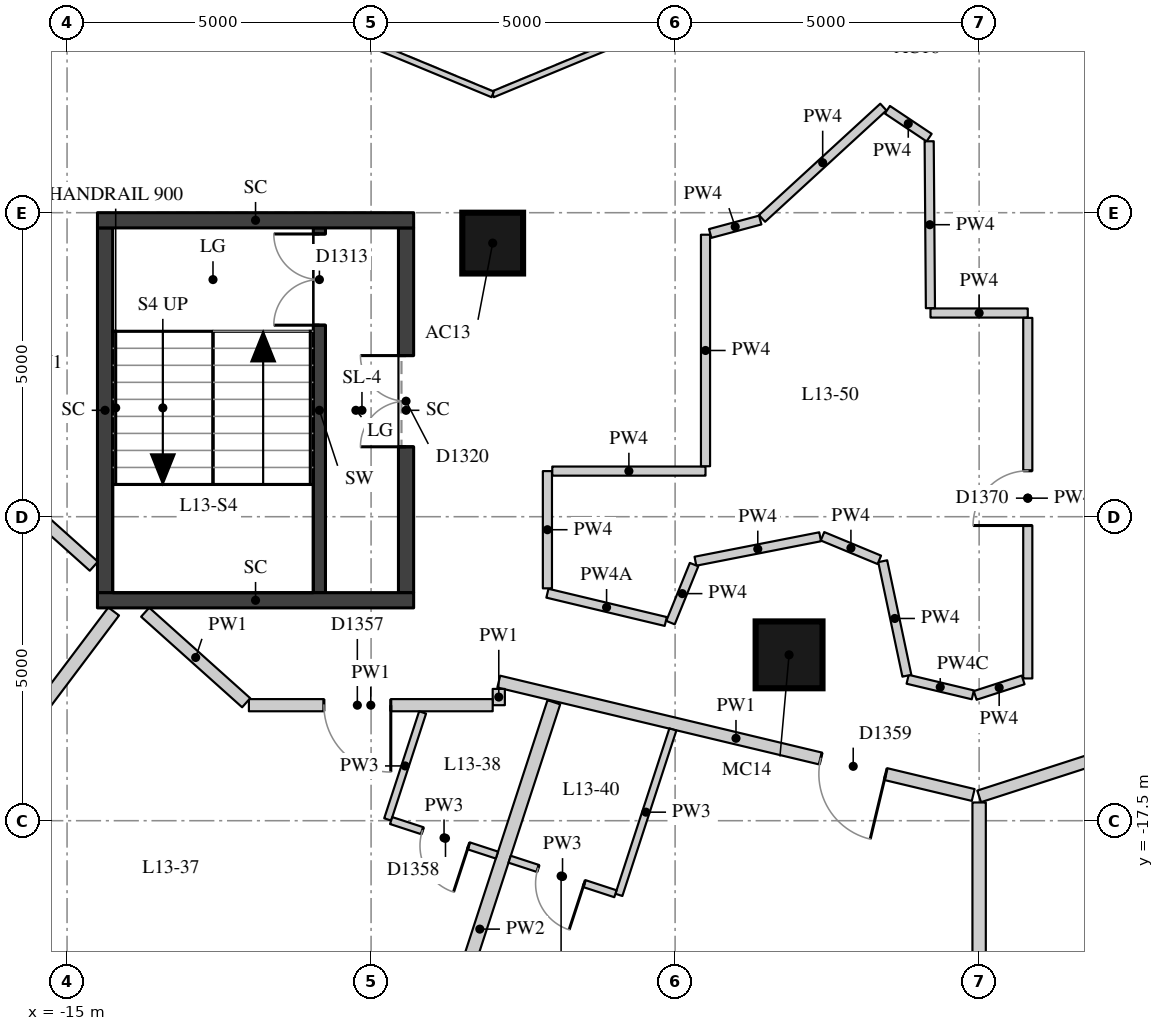
"""IFC4 building model, lengths in metres.
Left out: names, types, materials, properties, quantities, classifications, styles, units other than length and angle.
Written with IfcOpenShell. Run it as: python <this file> out.ifc"""

import sys

from ifc_helpers import new_model, si_unit, direction, frame, frame_2d, origin, origin_2d, place, context, subcontext, project, spatial, rectangle, extrude, element, fill, save


model = new_model("IFC4")
c1 = context("Model", 3, precision=1e-05, world=origin(), true_north=direction((0.0, 1.0)))
c2 = subcontext(c1, "Body", "Model", "MODEL_VIEW")
j1 = project(units=[si_unit("LENGTHUNIT", "METRE"), si_unit("PLANEANGLEUNIT", "RADIAN")], contexts=[c1])
p1 = place(None, origin())
s1 = spatial("IfcSite", under=j1, at=p1, CompositionType="ELEMENT")
p2 = place(p1, origin())
s2 = spatial("IfcBuilding", under=s1, at=p2, CompositionType="ELEMENT")
p3 = place(p2, frame((0.0, 0.0, 51.4)))
s3 = spatial("IfcBuildingStorey", under=s2, at=p3, CompositionType="ELEMENT", Elevation=51.4)
p4 = place(p3, frame((-8.0, -8.0, 0.0), z_axis=(0.0, 0.0, 1.0), x_axis=(1.0, 0.0, 0.0)))
e1 = element("IfcColumn", 1, at=p4, inside=s3, PredefinedType="COLUMN", context=c2, shape_type="SweptSolid", body=[
    extrude(rectangle(XDim=1.0, YDim=1.0, at=origin_2d()), origin(), (0.0, 0.0, 1.0), 3.3),
])
p5 = place(p3, frame((-3.126, -14.772, 0.0), z_axis=(0.0, 0.0, 1.0), x_axis=(1.0, 0.0, 0.0)))
e2 = element("IfcColumn", 2, at=p5, inside=s3, PredefinedType="COLUMN", context=c2, shape_type="SweptSolid", body=[
    extrude(rectangle(XDim=1.1, YDim=1.1, at=origin_2d()), origin(), (0.0, 0.0, 1.0), 3.3),
])
p6 = place(p3, frame((-10.85, -13.75, 0.0), z_axis=(0.0, 0.0, 1.0), x_axis=(0.0, 1.0, 0.0)))
e3 = element("IfcWall", 3, at=p6, inside=s3, PredefinedType="SHEAR", context=c2, shape_type="SweptSolid", body=[
    extrude(rectangle(XDim=6.0, YDim=0.2, at=frame_2d((3.0, 0.0))), origin(), (0.0, 0.0, 1.0), 3.02),
])
p7 = place(p6, frame((4.4, 0.0, 0.0)))
e4 = element("IfcOpeningElement", 4, at=p7, cuts=e3, PredefinedType="OPENING", context=c2, shape_type="SweptSolid", body=[
    extrude(rectangle(XDim=1.5, YDim=2.1, at=frame_2d((0.75, 1.05))), frame((0.0, 0.11, 0.0), z_axis=(0.0, -1.0, 0.0), x_axis=(1.0, 0.0, 0.0)), (0.0, 0.0, 1.0), 0.22),
])
p8 = place(p3, frame((-14.375, -13.75, -0.28), z_axis=(0.0, 0.0, 1.0), x_axis=(0.0, 1.0, 0.0)))
e5 = element("IfcWall", 5, at=p8, inside=s3, PredefinedType="SHEAR", context=c2, shape_type="SweptSolid", body=[
    extrude(rectangle(XDim=6.0, YDim=0.25, at=frame_2d((3.0, 0.0))), origin(), (0.0, 0.0, 1.0), 3.3),
])
p9 = place(p3, frame((-9.425, -13.75, -0.28), z_axis=(0.0, 0.0, 1.0), x_axis=(0.0, 1.0, 0.0)))
e6 = element("IfcWall", 6, at=p9, inside=s3, PredefinedType="SHEAR", context=c2, shape_type="SweptSolid", body=[
    extrude(rectangle(XDim=6.0, YDim=0.25, at=frame_2d((3.0, 0.0))), origin(), (0.0, 0.0, 1.0), 3.3),
])
p10 = place(p9, frame((2.4, 0.0, 0.28)))
e7 = element("IfcOpeningElement", 7, at=p10, cuts=e6, PredefinedType="OPENING", context=c2, shape_type="SweptSolid", body=[
    extrude(rectangle(XDim=1.5, YDim=2.1, at=frame_2d((0.75, 1.05))), frame((0.0, 0.135, 0.0), z_axis=(0.0, -1.0, 0.0), x_axis=(1.0, 0.0, 0.0)), (0.0, 0.0, 1.0), 0.27),
])
for number, where, z_axis, x_axis in (
    (8, (-14.5, -7.625, -0.28), (0.0, 0.0, 1.0), (1.0, 0.0, 0.0)),
    (9, (-14.5, -13.875, -0.28), (0.0, 0.0, 1.0), (1.0, 0.0, 0.0)),
):
    element("IfcWall", number, at=place(p3, frame(where, z_axis=z_axis, x_axis=x_axis)), inside=s3, PredefinedType="SHEAR", context=c2, shape_type="SweptSolid", body=[
        extrude(rectangle(XDim=5.2, YDim=0.25, at=frame_2d((2.6, 0.0))), origin(), (0.0, 0.0, 1.0), 3.3),
    ])
p11 = place(p3, frame((-14.559, -13.314, 0.0), z_axis=(0.0, 0.0, 1.0), x_axis=(-0.744636171002, 0.667470578254, 0.0)))
e10 = element("IfcWall", 10, at=p11, inside=s3, PredefinedType="PARTITIONING", context=c2, shape_type="SweptSolid", body=[
    extrude(rectangle(XDim=2.069, YDim=0.2, at=frame_2d((1.035, 0.0))), origin(), (0.0, 0.0, 1.0), 3.02),
])
p12 = place(p3, frame((10.792, -13.612, 0.0), z_axis=(0.0, 0.0, 1.0), x_axis=(-0.951542928403, -0.307515943336, 0.0)))
e11 = element("IfcWall", 11, at=p12, inside=s3, PredefinedType="PARTITIONING", context=c2, shape_type="SweptSolid", body=[
    extrude(rectangle(XDim=11.342, YDim=0.2, at=frame_2d((5.671, 0.0))), origin(), (0.0, 0.0, 1.0), 3.02),
])
p13 = place(p12, frame((3.239, 0.0, 0.0)))
e12 = element("IfcOpeningElement", 12, at=p13, cuts=e11, PredefinedType="OPENING", context=c2, shape_type="SweptSolid", body=[
    extrude(rectangle(XDim=1.1, YDim=2.1, at=frame_2d((0.55, 1.05))), frame((0.0, 0.11, 0.0), z_axis=(0.0, -1.0, 0.0), x_axis=(1.0, 0.0, 0.0)), (0.0, 0.0, 1.0), 0.22),
])
p14 = place(p3, frame((-0.098, -17.077, 0.0), z_axis=(0.0, 0.0, 1.0), x_axis=(-0.972607318404, 0.232454305588, 0.0)))
e13 = element("IfcWall", 13, at=p14, inside=s3, PredefinedType="PARTITIONING", context=c2, shape_type="SweptSolid", body=[
    extrude(rectangle(XDim=8.022, YDim=0.2, at=frame_2d((4.011, 0.0))), origin(), (0.0, 0.0, 1.0), 3.02),
])
p15 = place(p14, frame((1.479, 0.0, 0.0)))
e14 = element("IfcOpeningElement", 14, at=p15, cuts=e13, PredefinedType="OPENING", context=c2, shape_type="SweptSolid", body=[
    extrude(rectangle(XDim=1.1, YDim=2.1, at=frame_2d((0.55, 1.05))), frame((0.0, 0.11, 0.0), z_axis=(0.0, -1.0, 0.0), x_axis=(1.0, 0.0, 0.0)), (0.0, 0.0, 1.0), 0.22),
])
p16 = place(p3, frame((-7.9, -15.332, 0.0), z_axis=(0.0, 0.0, 1.0), x_axis=(0.0, -1.0, 0.0)))
e15 = element("IfcWall", 15, at=p16, inside=s3, PredefinedType="PARTITIONING", context=c2, shape_type="SweptSolid", body=[
    extrude(rectangle(XDim=0.268, YDim=0.2, at=frame_2d((0.134, 0.0))), origin(), (0.0, 0.0, 1.0), 3.02),
])
p17 = place(p3, frame((-8.0, -15.6, 0.0), z_axis=(0.0, 0.0, 1.0), x_axis=(-1.0, 0.0, 0.0)))
e16 = element("IfcWall", 16, at=p17, inside=s3, PredefinedType="PARTITIONING", context=c2, shape_type="SweptSolid", body=[
    extrude(rectangle(XDim=4.009, YDim=0.2, at=frame_2d((2.005, 0.0))), origin(), (0.0, 0.0, 1.0), 3.02),
])
p18 = place(p17, frame((1.676, 0.0, 0.0)))
e17 = element("IfcOpeningElement", 17, at=p18, cuts=e16, PredefinedType="OPENING", context=c2, shape_type="SweptSolid", body=[
    extrude(rectangle(XDim=1.1, YDim=2.1, at=frame_2d((0.55, 1.05))), frame((0.0, 0.11, 0.0), z_axis=(0.0, -1.0, 0.0), x_axis=(1.0, 0.0, 0.0)), (0.0, 0.0, 1.0), 0.22),
])
p19 = place(p3, frame((-12.054, -15.56, 0.0), z_axis=(0.0, 0.0, 1.0), x_axis=(-0.744625700487, 0.66748225907, 0.0)))
e18 = element("IfcWall", 18, at=p19, inside=s3, PredefinedType="PARTITIONING", context=c2, shape_type="SweptSolid", body=[
    extrude(rectangle(XDim=2.231, YDim=0.2, at=frame_2d((1.116, 0.0))), origin(), (0.0, 0.0, 1.0), 3.02),
])
p20 = place(p3, frame((-0.8, -9.15, 0.0), z_axis=(0.0, 0.0, 1.0), x_axis=(1.0, 0.0, 0.0)))
e19 = element("IfcWall", 19, at=p20, inside=s3, PredefinedType="PARTITIONING", context=c2, shape_type="SweptSolid", body=[
    extrude(rectangle(XDim=1.6, YDim=0.15, at=frame_2d((0.8, 0.0))), origin(), (0.0, 0.0, 1.0), 3.02),
])
p21 = place(p3, frame((0.8, -9.23, 0.0), z_axis=(0.0, 0.0, 1.0), x_axis=(0.0, -1.0, 0.0)))
e20 = element("IfcWall", 20, at=p21, inside=s3, PredefinedType="PARTITIONING", context=c2, shape_type="SweptSolid", body=[
    extrude(rectangle(XDim=5.93, YDim=0.15, at=frame_2d((2.965, 0.0))), origin(), (0.0, 0.0, 1.0), 3.02),
])
p22 = place(p21, frame((2.515, 0.0, 0.0)))
e21 = element("IfcOpeningElement", 21, at=p22, cuts=e20, PredefinedType="OPENING", context=c2, shape_type="SweptSolid", body=[
    extrude(rectangle(XDim=0.9, YDim=2.1, at=frame_2d((0.45, 1.05))), frame((0.0, 0.085, 0.0), z_axis=(0.0, -1.0, 0.0), x_axis=(1.0, 0.0, 0.0)), (0.0, 0.0, 1.0), 0.17),
])
p23 = place(p3, frame((0.724, -15.184, 0.0), z_axis=(0.0, 0.0, 1.0), x_axis=(-0.951444518554, -0.307820285415, 0.0)))
e22 = element("IfcWall", 22, at=p23, inside=s3, PredefinedType="PARTITIONING", context=c2, shape_type="SweptSolid", body=[
    extrude(rectangle(XDim=0.829, YDim=0.15, at=frame_2d((0.415, 0.0))), origin(), (0.0, 0.0, 1.0), 3.02),
])
p24 = place(p3, frame((-0.104, -15.43, 0.0), z_axis=(0.0, 0.0, 1.0), x_axis=(-0.972630060885, 0.232359128642, 0.0)))
e23 = element("IfcWall", 23, at=p24, inside=s3, PredefinedType="PARTITIONING", context=c2, shape_type="SweptSolid", body=[
    extrude(rectangle(XDim=1.102, YDim=0.15, at=frame_2d((0.551, 0.0))), origin(), (0.0, 0.0, 1.0), 2.42),
])
p25 = place(p3, frame((-1.188, -15.115, 0.0), z_axis=(0.0, 0.0, 1.0), x_axis=(-0.20649628494, 0.978447384536, 0.0)))
e24 = element("IfcWall", 24, at=p25, inside=s3, PredefinedType="PARTITIONING", context=c2, shape_type="SweptSolid", body=[
    extrude(rectangle(XDim=1.925, YDim=0.15, at=frame_2d((0.962, 0.0))), origin(), (0.0, 0.0, 1.0), 3.02),
])
p26 = place(p3, frame((-1.641, -13.209, 0.0), z_axis=(0.0, 0.0, 1.0), x_axis=(-0.923725449546, 0.383055209937, 0.0)))
e25 = element("IfcWall", 25, at=p26, inside=s3, PredefinedType="PARTITIONING", context=c2, shape_type="SweptSolid", body=[
    extrude(rectangle(XDim=1.011, YDim=0.15, at=frame_2d((0.506, 0.0))), origin(), (0.0, 0.0, 1.0), 3.02),
])
p27 = place(p3, frame((-2.615, -12.83, 0.0), z_axis=(0.0, 0.0, 1.0), x_axis=(-0.981297312652, -0.192498270593, 0.0)))
e26 = element("IfcWall", 26, at=p27, inside=s3, PredefinedType="PARTITIONING", context=c2, shape_type="SweptSolid", body=[
    extrude(rectangle(XDim=2.09, YDim=0.15, at=frame_2d((1.045, 0.0))), origin(), (0.0, 0.0, 1.0), 3.02),
])
p28 = place(p3, frame((-4.688, -13.288, 0.0), z_axis=(0.0, 0.0, 1.0), x_axis=(-0.375963709287, -0.926634388148, 0.0)))
e27 = element("IfcWall", 27, at=p28, inside=s3, PredefinedType="PARTITIONING", context=c2, shape_type="SweptSolid", body=[
    extrude(rectangle(XDim=1.03, YDim=0.15, at=frame_2d((0.515, 0.0))), origin(), (0.0, 0.0, 1.0), 3.02),
])
p29 = place(p3, frame((-5.154, -14.224, 0.0), z_axis=(0.0, 0.0, 1.0), x_axis=(-0.97258848944, 0.232533073366, 0.0)))
e28 = element("IfcWall", 28, at=p29, inside=s3, PredefinedType="PARTITIONING", context=c2, shape_type="SweptSolid", body=[
    extrude(rectangle(XDim=2.001, YDim=0.15, at=frame_2d((1.0, 0.0))), origin(), (0.0, 0.0, 1.0), 2.57),
])
p30 = place(p3, frame((-7.1, -13.678, 0.0), z_axis=(0.0, 0.0, 1.0), x_axis=(0.0, 1.0, 0.0)))
e29 = element("IfcWall", 29, at=p30, inside=s3, PredefinedType="PARTITIONING", context=c2, shape_type="SweptSolid", body=[
    extrude(rectangle(XDim=1.928, YDim=0.15, at=frame_2d((0.964, 0.0))), origin(), (0.0, 0.0, 1.0), 3.02),
])
p31 = place(p3, frame((-7.02, -11.75, 0.0), z_axis=(0.0, 0.0, 1.0), x_axis=(1.0, 0.0, 0.0)))
e30 = element("IfcWall", 30, at=p31, inside=s3, PredefinedType="PARTITIONING", context=c2, shape_type="SweptSolid", body=[
    extrude(rectangle(XDim=2.52, YDim=0.15, at=frame_2d((1.26, 0.0))), origin(), (0.0, 0.0, 1.0), 3.02),
])
p32 = place(p3, frame((-4.5, -11.67, 0.0), z_axis=(0.0, 0.0, 1.0), x_axis=(0.0, 1.0, 0.0)))
e31 = element("IfcWall", 31, at=p32, inside=s3, PredefinedType="PARTITIONING", context=c2, shape_type="SweptSolid", body=[
    extrude(rectangle(XDim=3.808, YDim=0.15, at=frame_2d((1.904, 0.0))), origin(), (0.0, 0.0, 1.0), 3.02),
])
p33 = place(p3, frame((-4.423, -7.842, 0.0), z_axis=(0.0, 0.0, 1.0), x_axis=(0.965853333569, 0.259089440221, 0.0)))
e32 = element("IfcWall", 32, at=p33, inside=s3, PredefinedType="PARTITIONING", context=c2, shape_type="SweptSolid", body=[
    extrude(rectangle(XDim=0.852, YDim=0.15, at=frame_2d((0.426, 0.0))), origin(), (0.0, 0.0, 1.0), 3.02),
])
p34 = place(p3, frame((-3.571, -7.594, 0.0), z_axis=(0.0, 0.0, 1.0), x_axis=(0.736783660812, 0.676128565555, 0.0)))
e33 = element("IfcWall", 33, at=p34, inside=s3, PredefinedType="PARTITIONING", context=c2, shape_type="SweptSolid", body=[
    extrude(rectangle(XDim=2.709, YDim=0.15, at=frame_2d((1.354, 0.0))), origin(), (0.0, 0.0, 1.0), 3.02),
])
p35 = place(p3, frame((-1.509, -5.806, 0.0), z_axis=(0.0, 0.0, 1.0), x_axis=(0.831367153095, -0.55572354346, 0.0)))
e34 = element("IfcWall", 34, at=p35, inside=s3, PredefinedType="PARTITIONING", context=c2, shape_type="SweptSolid", body=[
    extrude(rectangle(XDim=0.825, YDim=0.15, at=frame_2d((0.413, 0.0))), origin(), (0.0, 0.0, 1.0), 3.02),
])
p36 = place(p3, frame((-0.822, -6.325, 0.0), z_axis=(0.0, 0.0, 1.0), x_axis=(0.007471771501, -0.999972085926, 0.0)))
e35 = element("IfcWall", 35, at=p36, inside=s3, PredefinedType="PARTITIONING", context=c2, shape_type="SweptSolid", body=[
    extrude(rectangle(XDim=2.745, YDim=0.15, at=frame_2d((1.372, 0.0))), origin(), (0.0, 0.0, 1.0), 3.02),
])
p37 = place(p3, frame((-16.927, -17.638, 0.0), z_axis=(0.0, 0.0, 1.0), x_axis=(0.601158965663, 0.799129462605, 0.0)))
e36 = element("IfcWall", 36, at=p37, inside=s3, PredefinedType="PARTITIONING", context=c2, shape_type="SweptSolid", body=[
    extrude(rectangle(XDim=4.48, YDim=0.22, at=frame_2d((2.24, 0.0))), origin(), (0.0, 0.0, 1.0), 2.57),
])
p38 = place(p3, frame((-9.429, -23.014, 0.0), z_axis=(0.0, 0.0, 1.0), x_axis=(0.310249775859, 0.950655077607, 0.0)))
e37 = element("IfcWall", 37, at=p38, inside=s3, PredefinedType="PARTITIONING", context=c2, shape_type="SweptSolid", body=[
    extrude(rectangle(XDim=7.85, YDim=0.22, at=frame_2d((3.925, 0.0))), origin(), (0.0, 0.0, 1.0), 3.02),
])
p39 = place(p3, frame((0.0, -24.5, 0.0), z_axis=(0.0, 0.0, 1.0), x_axis=(0.0, 1.0, 0.0)))
e38 = element("IfcWall", 38, at=p39, inside=s3, PredefinedType="PARTITIONING", context=c2, shape_type="SweptSolid", body=[
    extrude(rectangle(XDim=7.3, YDim=0.22, at=frame_2d((3.65, 0.0))), origin(), (0.0, 0.0, 1.0), 2.47),
])
p40 = place(p3, frame((-9.153, -15.719, 0.0), z_axis=(0.0, 0.0, 1.0), x_axis=(-0.310326382186, -0.950630073435, 0.0)))
e39 = element("IfcWall", 39, at=p40, inside=s3, PredefinedType="PARTITIONING", context=c2, shape_type="SweptSolid", body=[
    extrude(rectangle(XDim=1.851, YDim=0.12, at=frame_2d((0.926, 0.0))), origin(), (0.0, 0.0, 1.0), 3.02),
])
p41 = place(p3, frame((-5.037, -15.999, 0.0), z_axis=(0.0, 0.0, 1.0), x_axis=(-0.310181518973, -0.950677350781, 0.0)))
e40 = element("IfcWall", 40, at=p41, inside=s3, PredefinedType="PARTITIONING", context=c2, shape_type="SweptSolid", body=[
    extrude(rectangle(XDim=2.862, YDim=0.12, at=frame_2d((1.431, 0.0))), origin(), (0.0, 0.0, 1.0), 3.02),
])
p42 = place(p3, frame((-9.67, -17.498, 0.0), z_axis=(0.0, 0.0, 1.0), x_axis=(0.950678536911, -0.31017788357, 0.0)))
e41 = element("IfcWall", 41, at=p42, inside=s3, PredefinedType="PARTITIONING", context=c2, shape_type="SweptSolid", body=[
    extrude(rectangle(XDim=1.83, YDim=0.12, at=frame_2d((0.915, 0.0))), origin(), (0.0, 0.0, 1.0), 3.02),
])
p43 = place(p42, frame((0.54, 0.0, 0.0)))
e42 = element("IfcOpeningElement", 42, at=p43, cuts=e41, PredefinedType="OPENING", context=c2, shape_type="SweptSolid", body=[
    extrude(rectangle(XDim=0.8, YDim=2.1, at=frame_2d((0.4, 1.05))), frame((0.0, 0.07, 0.0), z_axis=(0.0, -1.0, 0.0), x_axis=(1.0, 0.0, 0.0)), (0.0, 0.0, 1.0), 0.14),
])
p44 = place(p3, frame((-5.981, -18.701, 0.0), z_axis=(0.0, 0.0, 1.0), x_axis=(-0.950639191072, 0.310298450524, 0.0)))
e43 = element("IfcWall", 43, at=p44, inside=s3, PredefinedType="PARTITIONING", context=c2, shape_type="SweptSolid", body=[
    extrude(rectangle(XDim=1.83, YDim=0.12, at=frame_2d((0.915, 0.0))), origin(), (0.0, 0.0, 1.0), 3.02),
])
p45 = place(p44, frame((0.54, 0.0, 0.0)))
e44 = element("IfcOpeningElement", 44, at=p45, cuts=e43, PredefinedType="OPENING", context=c2, shape_type="SweptSolid", body=[
    extrude(rectangle(XDim=0.8, YDim=2.1, at=frame_2d((0.4, 1.05))), frame((0.0, 0.07, 0.0), z_axis=(0.0, -1.0, 0.0), x_axis=(1.0, 0.0, 0.0)), (0.0, 0.0, 1.0), 0.14),
])
for number, where, z_axis, x_axis in (
    (45, (-4.073, -3.927, 0.0), (0.0, 0.0, 1.0), (-0.924, -0.383, 0.0)),
    (46, (-8.0, -5.554, 0.0), (0.0, 0.0, 1.0), (-0.924, 0.383, 0.0)),
):
    element("IfcWall", number, at=place(p3, frame(where, z_axis=z_axis, x_axis=x_axis)), inside=s3, PredefinedType="PARTITIONING", context=c2, shape_type="SweptSolid", body=[
        extrude(rectangle(XDim=4.251, YDim=0.1, at=frame_2d((2.125, 0.0))), origin(), (0.0, 0.0, 1.0), 3.02),
    ])
p46 = place(p7, origin())
e47 = element("IfcDoor", 47, at=p46, inside=s3, OperationType="DOUBLE_DOOR_SINGLE_SWING", PredefinedType="DOOR", context=c2, shape_type="SweptSolid", body=[
    extrude(rectangle(XDim=1.5, YDim=2.1, at=frame_2d((0.75, 1.05))), frame((0.0, 0.025, 0.0), z_axis=(0.0, -1.0, 0.0), x_axis=(1.0, 0.0, 0.0)), (0.0, 0.0, 1.0), 0.05),
])
fill(e4, e47)
p47 = place(p10, origin())
e48 = element("IfcDoor", 48, at=p47, inside=s3, OperationType="DOUBLE_DOOR_SINGLE_SWING", PredefinedType="DOOR", context=c2, shape_type="SweptSolid", body=[
    extrude(rectangle(XDim=1.5, YDim=2.1, at=frame_2d((0.75, 1.05))), frame((0.0, 0.025, 0.0), z_axis=(0.0, -1.0, 0.0), x_axis=(1.0, 0.0, 0.0)), (0.0, 0.0, 1.0), 0.05),
])
fill(e7, e48)
p48 = place(p18, origin())
e49 = element("IfcDoor", 49, at=p48, inside=s3, OperationType="SINGLE_SWING_LEFT", PredefinedType="DOOR", context=c2, shape_type="SweptSolid", body=[
    extrude(rectangle(XDim=1.1, YDim=2.1, at=frame_2d((0.55, 1.05))), frame((0.0, 0.025, 0.0), z_axis=(0.0, -1.0, 0.0), x_axis=(1.0, 0.0, 0.0)), (0.0, 0.0, 1.0), 0.05),
])
fill(e17, e49)
p49 = place(p43, origin())
e50 = element("IfcDoor", 50, at=p49, inside=s3, OperationType="SINGLE_SWING_LEFT", PredefinedType="DOOR", context=c2, shape_type="SweptSolid", body=[
    extrude(rectangle(XDim=0.8, YDim=2.1, at=frame_2d((0.4, 1.05))), frame((0.0, 0.025, 0.0), z_axis=(0.0, -1.0, 0.0), x_axis=(1.0, 0.0, 0.0)), (0.0, 0.0, 1.0), 0.05),
])
fill(e42, e50)
p50 = place(p15, origin())
e51 = element("IfcDoor", 51, at=p50, inside=s3, OperationType="SINGLE_SWING_LEFT", PredefinedType="DOOR", context=c2, shape_type="SweptSolid", body=[
    extrude(rectangle(XDim=1.1, YDim=2.1, at=frame_2d((0.55, 1.05))), frame((0.0, 0.025, 0.0), z_axis=(0.0, -1.0, 0.0), x_axis=(1.0, 0.0, 0.0)), (0.0, 0.0, 1.0), 0.05),
])
fill(e14, e51)
p51 = place(p45, origin())
e52 = element("IfcDoor", 52, at=p51, inside=s3, OperationType="SINGLE_SWING_LEFT", PredefinedType="DOOR", context=c2, shape_type="SweptSolid", body=[
    extrude(rectangle(XDim=0.8, YDim=2.1, at=frame_2d((0.4, 1.05))), frame((0.0, 0.025, 0.0), z_axis=(0.0, -1.0, 0.0), x_axis=(1.0, 0.0, 0.0)), (0.0, 0.0, 1.0), 0.05),
])
fill(e44, e52)
p52 = place(p22, origin())
e53 = element("IfcDoor", 53, at=p52, inside=s3, OperationType="SINGLE_SWING_LEFT", PredefinedType="DOOR", context=c2, shape_type="SweptSolid", body=[
    extrude(rectangle(XDim=0.9, YDim=2.1, at=frame_2d((0.45, 1.05))), frame((0.0, 0.025, 0.0), z_axis=(0.0, -1.0, 0.0), x_axis=(1.0, 0.0, 0.0)), (0.0, 0.0, 1.0), 0.05),
])
fill(e21, e53)
save(model, sys.argv[1])
